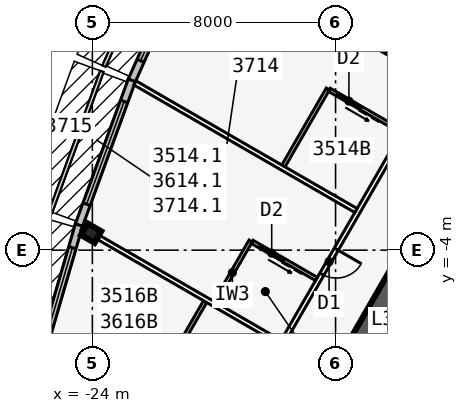
"""IFC4 building model, lengths in metres.
Left out: names, types, materials, properties, quantities, classifications, styles, units other than length and angle.
Written with IfcOpenShell. Run it as: python <this file> out.ifc"""

import sys

from ifc_helpers import new_model, si_unit, direction, frame, frame_2d, origin, origin_2d, place, context, subcontext, project, spatial, rectangle, i_section, extrude, element, fill, save


model = new_model("IFC4")
c1 = context("Model", 3, precision=1e-05, world=origin(), true_north=direction((0.0, 1.0)))
c2 = subcontext(c1, "Body", "Model", "MODEL_VIEW")
j1 = project(units=[si_unit("LENGTHUNIT", "METRE"), si_unit("PLANEANGLEUNIT", "RADIAN")], contexts=[c1])
p1 = place(None, origin())
s1 = spatial("IfcSite", under=j1, at=p1, CompositionType="ELEMENT")
p2 = place(p1, origin())
s2 = spatial("IfcBuilding", under=s1, at=p2, CompositionType="ELEMENT")
p3 = place(p2, frame((0.0, 0.0, 135.1)))
s3 = spatial("IfcBuildingStorey", under=s2, at=p3, CompositionType="ELEMENT", Elevation=135.1)
p4 = place(p3, frame((0.0, 19.052, 0.0), z_axis=(0.0, 0.0, 1.0), x_axis=(-0.499999749417, -0.866025548458, 0.0)))
e1 = element("IfcWall", 1, at=p4, inside=s3, PredefinedType="SHEAR", context=c2, shape_type="SweptSolid", body=[
    extrude(rectangle(XDim=33.0, YDim=0.9, at=frame_2d((16.5, 0.0))), origin(), (0.0, 0.0, 1.0), 3.4),
])
p5 = place(p4, frame((14.15, 0.0, 0.0)))
e2 = element("IfcOpeningElement", 2, at=p5, cuts=e1, PredefinedType="OPENING", context=c2, shape_type="SweptSolid", body=[
    extrude(rectangle(XDim=1.8, YDim=2.13, at=frame_2d((0.9, 1.065))), frame((0.0, 0.46, 0.0), z_axis=(0.0, -1.0, 0.0), x_axis=(1.0, 0.0, 0.0)), (0.0, 0.0, 1.0), 0.92),
])
p6 = place(p4, frame((12.6, 0.0, 0.0)))
e3 = element("IfcOpeningElement", 3, at=p6, cuts=e1, PredefinedType="OPENING", context=c2, shape_type="SweptSolid", body=[
    extrude(rectangle(XDim=1.0, YDim=2.13, at=frame_2d((0.5, 1.065))), frame((0.0, 0.46, 0.0), z_axis=(0.0, -1.0, 0.0), x_axis=(1.0, 0.0, 0.0)), (0.0, 0.0, 1.0), 0.92),
])
p7 = place(p3, frame((-24.041, -3.44, 0.0), z_axis=(0.0, 0.0, 1.0), x_axis=(-0.5, -0.866025403784, 0.0)))
e4 = element("IfcColumn", 4, at=p7, inside=s3, PredefinedType="COLUMN", context=c2, shape_type="SweptSolid", body=[
    extrude(i_section(OverallWidth=0.437, OverallDepth=0.513, WebThickness=0.061, FlangeThickness=0.097, at=origin_2d()), origin(), (0.0, 0.0, 1.0), 3.4),
])
p8 = place(p3, frame((-20.659, 6.169, 0.0), z_axis=(0.0, 0.0, 1.0), x_axis=(-0.406832200364, -0.913502906808, 0.0)))
e5 = element("IfcWall", 5, at=p8, inside=s3, PredefinedType="STANDARD", context=c2, shape_type="SweptSolid", body=[
    extrude(rectangle(XDim=5.028, YDim=0.25, at=frame_2d((2.514, 0.0))), origin(), (0.0, 0.0, 1.0), 3.235),
])
p9 = place(p8, frame((0.714, 0.0, 0.45)))
e6 = element("IfcOpeningElement", 6, at=p9, cuts=e5, PredefinedType="OPENING", context=c2, shape_type="SweptSolid", body=[
    extrude(rectangle(XDim=3.6, YDim=2.4, at=frame_2d((1.8, 1.2))), frame((0.0, 0.135, 0.0), z_axis=(0.0, -1.0, 0.0), x_axis=(1.0, 0.0, 0.0)), (0.0, 0.0, 1.0), 0.27),
])
p10 = place(p3, frame((-22.701, 1.584, 0.0), z_axis=(0.0, 0.0, 1.0), x_axis=(-0.343225593282, -0.939252996863, 0.0)))
e7 = element("IfcWall", 7, at=p10, inside=s3, PredefinedType="STANDARD", context=c2, shape_type="SweptSolid", body=[
    extrude(rectangle(XDim=5.076, YDim=0.25, at=frame_2d((2.538, 0.0))), origin(), (0.0, 0.0, 1.0), 3.235),
])
p11 = place(p10, frame((0.738, 0.0, 0.45)))
e8 = element("IfcOpeningElement", 8, at=p11, cuts=e7, PredefinedType="OPENING", context=c2, shape_type="SweptSolid", body=[
    extrude(rectangle(XDim=3.6, YDim=2.4, at=frame_2d((1.8, 1.2))), frame((0.0, 0.135, 0.0), z_axis=(0.0, -1.0, 0.0), x_axis=(1.0, 0.0, 0.0)), (0.0, 0.0, 1.0), 0.27),
])
p12 = place(p3, frame((-24.441, -3.175, 0.0), z_axis=(0.0, 0.0, 1.0), x_axis=(-0.279528287117, -0.960137457191, 0.0)))
e9 = element("IfcWall", 9, at=p12, inside=s3, PredefinedType="STANDARD", context=c2, shape_type="SweptSolid", body=[
    extrude(rectangle(XDim=5.148, YDim=0.25, at=frame_2d((2.574, 0.0))), origin(), (0.0, 0.0, 1.0), 3.235),
])
p13 = place(p12, frame((0.774, 0.0, 0.45)))
e10 = element("IfcOpeningElement", 10, at=p13, cuts=e9, PredefinedType="OPENING", context=c2, shape_type="SweptSolid", body=[
    extrude(rectangle(XDim=3.6, YDim=2.4, at=frame_2d((1.8, 1.2))), frame((0.0, 0.135, 0.0), z_axis=(0.0, -1.0, 0.0), x_axis=(1.0, 0.0, 0.0)), (0.0, 0.0, 1.0), 0.27),
])
p14 = place(p3, frame((-0.5, 22.836, 0.0), z_axis=(0.0, 0.0, 1.0), x_axis=(-0.500001677587, -0.866024435227, 0.0)))
e11 = element("IfcWall", 11, at=p14, inside=s3, PredefinedType="PARTITIONING", context=c2, shape_type="SweptSolid", body=[
    extrude(rectangle(XDim=39.054, YDim=0.15, at=frame_2d((19.527, 0.0))), origin(), (0.0, 0.0, 1.0), 3.235),
])
p15 = place(p14, frame((1.558, 0.0, 0.0)))
e12 = element("IfcOpeningElement", 12, at=p15, cuts=e11, PredefinedType="OPENING", context=c2, shape_type="SweptSolid", body=[
    extrude(rectangle(XDim=0.95, YDim=2.13, at=frame_2d((0.475, 1.065))), frame((0.0, 0.085, 0.0), z_axis=(0.0, -1.0, 0.0), x_axis=(1.0, 0.0, 0.0)), (0.0, 0.0, 1.0), 0.17),
])
p16 = place(p14, frame((10.952, 0.0, 0.0)))
e13 = element("IfcOpeningElement", 13, at=p16, cuts=e11, PredefinedType="OPENING", context=c2, shape_type="SweptSolid", body=[
    extrude(rectangle(XDim=0.95, YDim=2.13, at=frame_2d((0.475, 1.065))), frame((0.0, 0.085, 0.0), z_axis=(0.0, -1.0, 0.0), x_axis=(1.0, 0.0, 0.0)), (0.0, 0.0, 1.0), 0.17),
])
p17 = place(p14, frame((17.752, 0.0, 0.0)))
e14 = element("IfcOpeningElement", 14, at=p17, cuts=e11, PredefinedType="OPENING", context=c2, shape_type="SweptSolid", body=[
    extrude(rectangle(XDim=0.95, YDim=2.13, at=frame_2d((0.475, 1.065))), frame((0.0, 0.085, 0.0), z_axis=(0.0, -1.0, 0.0), x_axis=(1.0, 0.0, 0.0)), (0.0, 0.0, 1.0), 0.17),
])
p18 = place(p14, frame((21.552, 0.0, 0.0)))
e15 = element("IfcOpeningElement", 15, at=p18, cuts=e11, PredefinedType="OPENING", context=c2, shape_type="SweptSolid", body=[
    extrude(rectangle(XDim=0.95, YDim=2.13, at=frame_2d((0.475, 1.065))), frame((0.0, 0.085, 0.0), z_axis=(0.0, -1.0, 0.0), x_axis=(1.0, 0.0, 0.0)), (0.0, 0.0, 1.0), 0.17),
])
p19 = place(p14, frame((30.952, 0.0, 0.0)))
e16 = element("IfcOpeningElement", 16, at=p19, cuts=e11, PredefinedType="OPENING", context=c2, shape_type="SweptSolid", body=[
    extrude(rectangle(XDim=0.95, YDim=2.13, at=frame_2d((0.475, 1.065))), frame((0.0, 0.085, 0.0), z_axis=(0.0, -1.0, 0.0), x_axis=(1.0, 0.0, 0.0)), (0.0, 0.0, 1.0), 0.17),
])
p20 = place(p14, frame((37.752, 0.0, 0.0)))
e17 = element("IfcOpeningElement", 17, at=p20, cuts=e11, PredefinedType="OPENING", context=c2, shape_type="SweptSolid", body=[
    extrude(rectangle(XDim=0.95, YDim=2.13, at=frame_2d((0.475, 1.065))), frame((0.0, 0.085, 0.0), z_axis=(0.0, -1.0, 0.0), x_axis=(1.0, 0.0, 0.0)), (0.0, 0.0, 1.0), 0.17),
])
p21 = place(p3, frame((-12.829, 1.633, 0.0), z_axis=(0.0, 0.0, 1.0), x_axis=(-0.866027015393, 0.499997208602, 0.0)))
e18 = element("IfcWall", 18, at=p21, inside=s3, PredefinedType="PARTITIONING", context=c2, shape_type="SweptSolid", body=[
    extrude(rectangle(XDim=8.922, YDim=0.1, at=frame_2d((4.461, 0.0))), origin(), (0.0, 0.0, 1.0), 2.389),
])
p22 = place(p21, frame((0.45, 0.0, 0.0)))
e19 = element("IfcOpeningElement", 19, at=p22, cuts=e18, PredefinedType="OPENING", context=c2, shape_type="SweptSolid", body=[
    extrude(rectangle(XDim=0.9, YDim=2.13, at=frame_2d((0.45, 1.065))), frame((0.0, 0.06, 0.0), z_axis=(0.0, -1.0, 0.0), x_axis=(1.0, 0.0, 0.0)), (0.0, 0.0, 1.0), 0.12),
])
p23 = place(p3, frame((-15.329, -2.697, 0.0), z_axis=(0.0, 0.0, 1.0), x_axis=(-0.866024316602, 0.50000188305, 0.0)))
e20 = element("IfcWall", 20, at=p23, inside=s3, PredefinedType="PARTITIONING", context=c2, shape_type="SweptSolid", body=[
    extrude(rectangle(XDim=8.395, YDim=0.15, at=frame_2d((4.198, 0.0))), origin(), (0.0, 0.0, 1.0), 2.389),
])
p24 = place(p3, frame((-17.829, -7.027, 0.0), z_axis=(0.0, 0.0, 1.0), x_axis=(-0.866029804378, 0.499992377871, 0.0)))
e21 = element("IfcWall", 21, at=p24, inside=s3, PredefinedType="PARTITIONING", context=c2, shape_type="SweptSolid", body=[
    extrude(rectangle(XDim=7.516, YDim=0.15, at=frame_2d((3.758, 0.0))), origin(), (0.0, 0.0, 1.0), 2.389),
])
p25 = place(p3, frame((-16.253, 1.301, 0.0), z_axis=(0.0, 0.0, 1.0), x_axis=(-0.499990139034, -0.866031096941, 0.0)))
e22 = element("IfcWall", 22, at=p25, inside=s3, PredefinedType="PLUMBINGWALL", context=c2, shape_type="SweptSolid", body=[
    extrude(rectangle(XDim=3.0, YDim=0.12, at=frame_2d((1.5, 0.0))), origin(), (0.0, 0.0, 1.0), 3.235),
])
p26 = place(p3, frame((-13.829, -0.099, 0.0), z_axis=(0.0, 0.0, 1.0), x_axis=(-0.865997131366, 0.500048966069, 0.0)))
e23 = element("IfcWall", 23, at=p26, inside=s3, PredefinedType="PLUMBINGWALL", context=c2, shape_type="SweptSolid", body=[
    extrude(rectangle(XDim=2.74, YDim=0.12, at=frame_2d((1.37, 0.0))), origin(), (0.0, 0.0, 1.0), 3.235),
])
p27 = place(p26, frame((1.55, 0.0, 0.0)))
e24 = element("IfcOpeningElement", 24, at=p27, cuts=e23, PredefinedType="OPENING", context=c2, shape_type="SweptSolid", body=[
    extrude(rectangle(XDim=0.9, YDim=2.13, at=frame_2d((0.45, 1.065))), frame((0.0, 0.07, 0.0), z_axis=(0.0, -1.0, 0.0), x_axis=(1.0, 0.0, 0.0)), (0.0, 0.0, 1.0), 0.14),
])
p28 = place(p3, frame((-18.793, -3.699, 0.0), z_axis=(0.0, 0.0, 1.0), x_axis=(-0.500001309137, -0.866024647952, 0.0)))
e25 = element("IfcWall", 25, at=p28, inside=s3, PredefinedType="PLUMBINGWALL", context=c2, shape_type="SweptSolid", body=[
    extrude(rectangle(XDim=2.4, YDim=0.12, at=frame_2d((1.2, 0.0))), origin(), (0.0, 0.0, 1.0), 3.235),
])
p29 = place(p3, frame((-16.628, -4.949, 0.0), z_axis=(0.0, 0.0, 1.0), x_axis=(-0.866048967903, 0.499959183527, 0.0)))
e26 = element("IfcWall", 26, at=p29, inside=s3, PredefinedType="PLUMBINGWALL", context=c2, shape_type="SweptSolid", body=[
    extrude(rectangle(XDim=2.44, YDim=0.12, at=frame_2d((1.22, 0.0))), origin(), (0.0, 0.0, 1.0), 3.235),
])
p30 = place(p29, frame((1.25, 0.0, 0.0)))
e27 = element("IfcOpeningElement", 27, at=p30, cuts=e26, PredefinedType="OPENING", context=c2, shape_type="SweptSolid", body=[
    extrude(rectangle(XDim=0.9, YDim=2.13, at=frame_2d((0.45, 1.065))), frame((0.0, 0.07, 0.0), z_axis=(0.0, -1.0, 0.0), x_axis=(1.0, 0.0, 0.0)), (0.0, 0.0, 1.0), 0.14),
])
p31 = place(p3, frame((-20.253, -5.627, 0.0), z_axis=(0.0, 0.0, 1.0), x_axis=(-0.499990139034, -0.866031096941, 0.0)))
e28 = element("IfcWall", 28, at=p31, inside=s3, PredefinedType="PLUMBINGWALL", context=c2, shape_type="SweptSolid", body=[
    extrude(rectangle(XDim=3.0, YDim=0.12, at=frame_2d((1.5, 0.0))), origin(), (0.0, 0.0, 1.0), 3.235),
])
p32 = place(p9, origin())
e29 = element("IfcWindow", 29, at=p32, inside=s3, PartitioningType="SINGLE_PANEL", PredefinedType="WINDOW", context=c2, shape_type="SweptSolid", body=[
    extrude(rectangle(XDim=3.6, YDim=2.4, at=frame_2d((1.8, 1.2))), frame((0.0, 0.03, 0.0), z_axis=(0.0, -1.0, 0.0), x_axis=(1.0, 0.0, 0.0)), (0.0, 0.0, 1.0), 0.06),
])
fill(e6, e29)
p33 = place(p11, origin())
e30 = element("IfcWindow", 30, at=p33, inside=s3, PartitioningType="SINGLE_PANEL", PredefinedType="WINDOW", context=c2, shape_type="SweptSolid", body=[
    extrude(rectangle(XDim=3.6, YDim=2.4, at=frame_2d((1.8, 1.2))), frame((0.0, 0.03, 0.0), z_axis=(0.0, -1.0, 0.0), x_axis=(1.0, 0.0, 0.0)), (0.0, 0.0, 1.0), 0.06),
])
fill(e8, e30)
p34 = place(p13, origin())
e31 = element("IfcWindow", 31, at=p34, inside=s3, PartitioningType="SINGLE_PANEL", PredefinedType="WINDOW", context=c2, shape_type="SweptSolid", body=[
    extrude(rectangle(XDim=3.6, YDim=2.4, at=frame_2d((1.8, 1.2))), frame((0.0, 0.03, 0.0), z_axis=(0.0, -1.0, 0.0), x_axis=(1.0, 0.0, 0.0)), (0.0, 0.0, 1.0), 0.06),
])
fill(e10, e31)
p35 = place(p27, origin())
e32 = element("IfcDoor", 32, at=p35, inside=s3, OperationType="SLIDING_TO_LEFT", PredefinedType="DOOR", context=c2, shape_type="SweptSolid", body=[
    extrude(rectangle(XDim=0.9, YDim=2.13, at=frame_2d((0.45, 1.065))), frame((0.0, 0.025, 0.0), z_axis=(0.0, -1.0, 0.0), x_axis=(1.0, 0.0, 0.0)), (0.0, 0.0, 1.0), 0.05),
])
fill(e24, e32)
p36 = place(p30, origin())
e33 = element("IfcDoor", 33, at=p36, inside=s3, OperationType="SLIDING_TO_LEFT", PredefinedType="DOOR", context=c2, shape_type="SweptSolid", body=[
    extrude(rectangle(XDim=0.9, YDim=2.13, at=frame_2d((0.45, 1.065))), frame((0.0, 0.025, 0.0), z_axis=(0.0, -1.0, 0.0), x_axis=(1.0, 0.0, 0.0)), (0.0, 0.0, 1.0), 0.05),
])
fill(e27, e33)
p37 = place(p19, origin())
e34 = element("IfcDoor", 34, at=p37, inside=s3, OperationType="SINGLE_SWING_LEFT", PredefinedType="DOOR", context=c2, shape_type="SweptSolid", body=[
    extrude(rectangle(XDim=0.95, YDim=2.13, at=frame_2d((0.475, 1.065))), frame((0.0, 0.025, 0.0), z_axis=(0.0, -1.0, 0.0), x_axis=(1.0, 0.0, 0.0)), (0.0, 0.0, 1.0), 0.05),
])
fill(e16, e34)
save(model, sys.argv[1])
